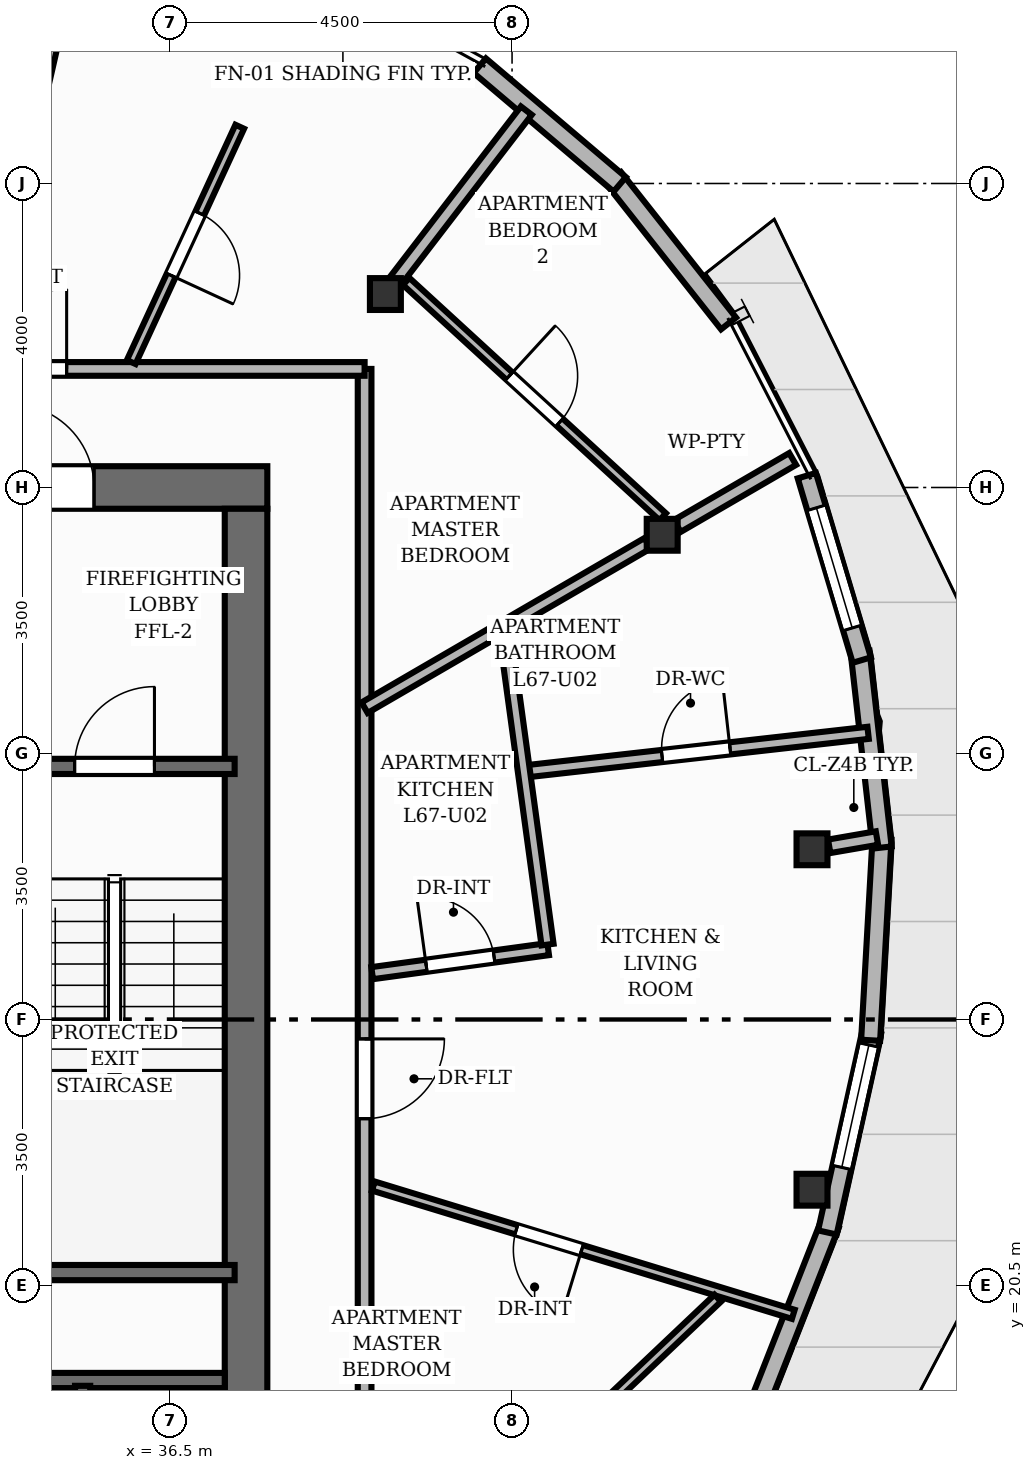
"""IFC4 building model, lengths in metres.
Left out: names, types, materials, properties, quantities, classifications, styles, units other than length and angle.
Written with IfcOpenShell. Run it as: python <this file> out.ifc"""

import sys

from ifc_helpers import new_model, si_unit, direction, frame, frame_2d, origin, origin_2d, place, context, subcontext, project, spatial, rectangle, i_section, extrude, element, fill, save


model = new_model("IFC4")
c1 = context("Model", 3, precision=1e-05, world=origin(), true_north=direction((0.0, 1.0)))
c2 = subcontext(c1, "Body", "Model", "MODEL_VIEW")
j1 = project(units=[si_unit("LENGTHUNIT", "METRE"), si_unit("PLANEANGLEUNIT", "RADIAN")], contexts=[c1])
p1 = place(None, origin())
s1 = spatial("IfcSite", under=j1, at=p1, CompositionType="ELEMENT")
p2 = place(p1, origin())
s2 = spatial("IfcBuilding", under=s1, at=p2, CompositionType="ELEMENT")
p3 = place(p2, frame((0.0, 0.0, 223.84)))
s3 = spatial("IfcBuildingStorey", under=s2, at=p3, CompositionType="ELEMENT", Elevation=223.84)
p4 = place(p3, frame((26.22, 31.0, 0.0), z_axis=(0.0, 0.0, 1.0), x_axis=(1.0, 0.0, 0.0)))
e1 = element("IfcWall", 1, at=p4, inside=s3, PredefinedType="SHEAR", context=c2, shape_type="SweptSolid", body=[
    extrude(rectangle(XDim=11.56, YDim=0.56, at=frame_2d((5.78, 0.0))), origin(), (0.0, 0.0, 1.0), 3.2),
])
p5 = place(p4, frame((8.18, 0.0, 0.0)))
e2 = element("IfcOpeningElement", 2, at=p5, cuts=e1, PredefinedType="OPENING", context=c2, shape_type="SweptSolid", body=[
    extrude(rectangle(XDim=1.1, YDim=2.15, at=frame_2d((0.55, 1.075))), frame((0.0, 0.29, 0.0), z_axis=(0.0, -1.0, 0.0), x_axis=(1.0, 0.0, 0.0)), (0.0, 0.0, 1.0), 0.58),
])
p6 = place(p4, frame((0.805, 0.0, 0.0)))
e3 = element("IfcOpeningElement", 3, at=p6, cuts=e1, PredefinedType="OPENING", context=c2, shape_type="SweptSolid", body=[
    extrude(rectangle(XDim=1.05, YDim=2.15, at=frame_2d((0.525, 1.075))), frame((0.0, 0.29, 0.0), z_axis=(0.0, -1.0, 0.0), x_axis=(1.0, 0.0, 0.0)), (0.0, 0.0, 1.0), 0.58),
])
p7 = place(p4, frame((2.555, 0.0, 0.0)))
e4 = element("IfcOpeningElement", 4, at=p7, cuts=e1, PredefinedType="OPENING", context=c2, shape_type="SweptSolid", body=[
    extrude(rectangle(XDim=1.05, YDim=2.15, at=frame_2d((0.525, 1.075))), frame((0.0, 0.29, 0.0), z_axis=(0.0, -1.0, 0.0), x_axis=(1.0, 0.0, 0.0)), (0.0, 0.0, 1.0), 0.58),
])
p8 = place(p4, frame((4.305, 0.0, 0.0)))
e5 = element("IfcOpeningElement", 5, at=p8, cuts=e1, PredefinedType="OPENING", context=c2, shape_type="SweptSolid", body=[
    extrude(rectangle(XDim=1.05, YDim=2.15, at=frame_2d((0.525, 1.075))), frame((0.0, 0.29, 0.0), z_axis=(0.0, -1.0, 0.0), x_axis=(1.0, 0.0, 0.0)), (0.0, 0.0, 1.0), 0.58),
])
p9 = place(p3, frame((37.5, 17.28, 0.0), z_axis=(0.0, 0.0, 1.0), x_axis=(0.0, 1.0, 0.0)))
e6 = element("IfcWall", 6, at=p9, inside=s3, PredefinedType="SHEAR", context=c2, shape_type="SweptSolid", body=[
    extrude(rectangle(XDim=13.44, YDim=0.56, at=frame_2d((6.72, 0.0))), origin(), (0.0, 0.0, 1.0), 3.2),
])
for number, where, z_axis, x_axis in (
    (7, (44.946, 26.24, 0.0), (0.0, 0.0, 1.0), (1.0, 0.0, 0.0)),
    (8, (42.975, 30.378, 0.0), (0.0, 0.0, 1.0), (1.0, 0.0, 0.0)),
    (9, (39.333, 33.545, 0.0), (0.0, 0.0, 1.0), (1.0, 0.0, 0.0)),
    (10, (44.946, 21.76, 0.0), (0.0, 0.0, 1.0), (1.0, 0.0, 0.0)),
):
    element("IfcColumn", number, at=place(p3, frame(where, z_axis=z_axis, x_axis=x_axis)), inside=s3, PredefinedType="COLUMN", context=c2, shape_type="SweptSolid", body=[
        extrude(i_section(OverallWidth=0.407, OverallDepth=0.419, WebThickness=0.031, FlangeThickness=0.049, at=origin_2d()), origin(), (0.0, 0.0, 1.0), 3.2),
    ])
p10 = place(p3, frame((45.18, 21.302, 0.0), z_axis=(0.0, 0.0, 1.0), x_axis=(-0.365588934877, -0.930776412838, 0.0)))
e11 = element("IfcWall", 11, at=p10, inside=s3, PredefinedType="SOLIDWALL", context=c2, shape_type="SweptSolid", body=[
    extrude(rectangle(XDim=2.739, YDim=0.25, at=frame_2d((1.369, 0.0))), origin(), (0.0, 0.0, 1.0), 2.577),
])
p11 = place(p3, frame((45.733, 23.836, 0.0), z_axis=(0.0, 0.0, 1.0), x_axis=(-0.21633718885, -0.976318708579, 0.0)))
e12 = element("IfcWall", 12, at=p11, inside=s3, PredefinedType="SOLIDWALL", context=c2, shape_type="SweptSolid", body=[
    extrude(rectangle(XDim=2.702, YDim=0.25, at=frame_2d((1.351, 0.0))), origin(), (0.0, 0.0, 1.0), 2.577),
])
p12 = place(p11, frame((0.175, 0.0, 0.85)))
e13 = element("IfcOpeningElement", 13, at=p12, cuts=e12, PredefinedType="OPENING", context=c2, shape_type="SweptSolid", body=[
    extrude(rectangle(XDim=1.65, YDim=1.55, at=frame_2d((0.825, 0.775))), frame((0.0, 0.135, 0.0), z_axis=(0.0, -1.0, 0.0), x_axis=(1.0, 0.0, 0.0)), (0.0, 0.0, 1.0), 0.27),
])
p13 = place(p3, frame((45.867, 26.374, 0.0), z_axis=(0.0, 0.0, 1.0), x_axis=(-0.056270814174, -0.998415542483, 0.0)))
e14 = element("IfcWall", 14, at=p13, inside=s3, PredefinedType="SOLIDWALL", context=c2, shape_type="SweptSolid", body=[
    extrude(rectangle(XDim=2.651, YDim=0.25, at=frame_2d((1.325, 0.0))), origin(), (0.0, 0.0, 1.0), 2.96),
])
p14 = place(p3, frame((45.579, 28.839, 0.0), z_axis=(0.0, 0.0, 1.0), x_axis=(0.112260931198, -0.993678762642, 0.0)))
e15 = element("IfcWall", 15, at=p14, inside=s3, PredefinedType="SOLIDWALL", context=c2, shape_type="SweptSolid", body=[
    extrude(rectangle(XDim=2.592, YDim=0.25, at=frame_2d((1.296, 0.0))), origin(), (0.0, 0.0, 1.0), 2.96),
])
p15 = place(p3, frame((44.878, 31.156, 0.0), z_axis=(0.0, 0.0, 1.0), x_axis=(0.285604720301, -0.958347506775, 0.0)))
e16 = element("IfcWall", 16, at=p15, inside=s3, PredefinedType="SOLIDWALL", context=c2, shape_type="SweptSolid", body=[
    extrude(rectangle(XDim=2.532, YDim=0.25, at=frame_2d((1.266, 0.0))), origin(), (0.0, 0.0, 1.0), 2.96),
])
p16 = place(p15, frame((0.441, 0.0, 0.85)))
e17 = element("IfcOpeningElement", 17, at=p16, cuts=e16, PredefinedType="OPENING", context=c2, shape_type="SweptSolid", body=[
    extrude(rectangle(XDim=1.65, YDim=1.55, at=frame_2d((0.825, 0.775))), frame((0.0, 0.135, 0.0), z_axis=(0.0, -1.0, 0.0), x_axis=(1.0, 0.0, 0.0)), (0.0, 0.0, 1.0), 0.27),
])
p17 = place(p3, frame((42.337, 35.071, 0.0), z_axis=(0.0, 0.0, 1.0), x_axis=(0.619881401672, -0.784695512833, 0.0)))
e18 = element("IfcWall", 18, at=p17, inside=s3, PredefinedType="SOLIDWALL", context=c2, shape_type="SweptSolid", body=[
    extrude(rectangle(XDim=2.437, YDim=0.25, at=frame_2d((1.218, 0.0))), origin(), (0.0, 0.0, 1.0), 2.96),
])
p18 = place(p3, frame((40.575, 36.55, 0.0), z_axis=(0.0, 0.0, 1.0), x_axis=(0.762614923672, -0.646852748462, 0.0)))
e19 = element("IfcWall", 19, at=p18, inside=s3, PredefinedType="SOLIDWALL", context=c2, shape_type="SweptSolid", body=[
    extrude(rectangle(XDim=2.415, YDim=0.25, at=frame_2d((1.208, 0.0))), origin(), (0.0, 0.0, 1.0), 2.96),
])
p19 = place(p3, frame((34.11, 20.67, 0.0), z_axis=(0.0, 0.0, 1.0), x_axis=(1.0, 0.0, 0.0)))
e20 = element("IfcWall", 20, at=p19, inside=s3, PredefinedType="SHEAR", context=c2, shape_type="SweptSolid", body=[
    extrude(rectangle(XDim=3.24, YDim=0.2, at=frame_2d((1.62, 0.0))), origin(), (0.0, 0.0, 1.0), 3.2),
])
p20 = place(p3, frame((34.11, 27.33, 0.0), z_axis=(0.0, 0.0, 1.0), x_axis=(1.0, 0.0, 0.0)))
e21 = element("IfcWall", 21, at=p20, inside=s3, PredefinedType="SHEAR", context=c2, shape_type="SweptSolid", body=[
    extrude(rectangle(XDim=3.24, YDim=0.2, at=frame_2d((1.62, 0.0))), origin(), (0.0, 0.0, 1.0), 3.2),
])
p21 = place(p20, frame((1.135, 0.0, 0.0)))
e22 = element("IfcOpeningElement", 22, at=p21, cuts=e21, PredefinedType="OPENING", context=c2, shape_type="SweptSolid", body=[
    extrude(rectangle(XDim=1.05, YDim=2.15, at=frame_2d((0.525, 1.075))), frame((0.0, 0.11, 0.0), z_axis=(0.0, -1.0, 0.0), x_axis=(1.0, 0.0, 0.0)), (0.0, 0.0, 1.0), 0.22),
])
p22 = place(p3, frame((33.5, 19.25, 0.0), z_axis=(0.0, 0.0, 1.0), x_axis=(1.0, 0.0, 0.0)))
e23 = element("IfcWall", 23, at=p22, inside=s3, PredefinedType="SHEAR", context=c2, shape_type="SweptSolid", body=[
    extrude(rectangle(XDim=3.72, YDim=0.2, at=frame_2d((1.86, 0.0))), origin(), (0.0, 0.0, 1.0), 3.2),
])
p23 = place(p3, frame((35.35, 17.32, 0.0), z_axis=(0.0, 0.0, 1.0), x_axis=(0.0, 1.0, 0.0)))
e24 = element("IfcWall", 24, at=p23, inside=s3, PredefinedType="SHEAR", context=c2, shape_type="SweptSolid", body=[
    extrude(rectangle(XDim=1.86, YDim=0.2, at=frame_2d((0.93, 0.0))), origin(), (0.0, 0.0, 1.0), 3.2),
])
p24 = place(p3, frame((45.173, 26.279, 0.0), z_axis=(0.0, 0.0, 1.0), x_axis=(0.985371537423, 0.170419873359, 0.0)))
e25 = element("IfcWall", 25, at=p24, inside=s3, PredefinedType="PARTITIONING", context=c2, shape_type="SweptSolid", body=[
    extrude(rectangle(XDim=0.637, YDim=0.18, at=frame_2d((0.319, 0.0))), origin(), (0.0, 0.0, 1.0), 2.403),
])
p25 = place(p3, frame((43.174, 30.493, 0.0), z_axis=(0.0, 0.0, 1.0), x_axis=(0.864599922959, 0.502460917106, 0.0)))
e26 = element("IfcWall", 26, at=p25, inside=s3, PredefinedType="PARTITIONING", context=c2, shape_type="SweptSolid", body=[
    extrude(rectangle(XDim=1.756, YDim=0.18, at=frame_2d((0.878, 0.0))), origin(), (0.0, 0.0, 1.0), 2.403),
])
p26 = place(p3, frame((39.473, 33.727, 0.0), z_axis=(0.0, 0.0, 1.0), x_axis=(0.609232660573, 0.792991529142, 0.0)))
e27 = element("IfcWall", 27, at=p26, inside=s3, PredefinedType="PARTITIONING", context=c2, shape_type="SweptSolid", body=[
    extrude(rectangle(XDim=2.814, YDim=0.18, at=frame_2d((1.407, 0.0))), origin(), (0.0, 0.0, 1.0), 2.403),
])
p27 = place(p3, frame((34.626, 35.483, 0.0), z_axis=(0.0, 0.0, 1.0), x_axis=(0.22291168124, 0.974838644272, 0.0)))
e28 = element("IfcWall", 28, at=p27, inside=s3, PredefinedType="PARTITIONING", context=c2, shape_type="SweptSolid", body=[
    extrude(rectangle(XDim=2.976, YDim=0.18, at=frame_2d((1.488, 0.0))), origin(), (0.0, 0.0, 1.0), 2.403),
])
p28 = place(p3, frame((39.06, 32.56, 0.0), z_axis=(0.0, 0.0, 1.0), x_axis=(0.0, -1.0, 0.0)))
e29 = element("IfcWall", 29, at=p28, inside=s3, PredefinedType="PARTITIONING", context=c2, shape_type="SweptSolid", body=[
    extrude(rectangle(XDim=17.12, YDim=0.18, at=frame_2d((8.56, 0.0))), origin(), (0.0, 0.0, 1.0), 2.955),
])
p29 = place(p28, frame((8.815, 0.0, 0.0)))
e30 = element("IfcOpeningElement", 30, at=p29, cuts=e29, PredefinedType="OPENING", context=c2, shape_type="SweptSolid", body=[
    extrude(rectangle(XDim=1.05, YDim=2.15, at=frame_2d((0.525, 1.075))), frame((0.0, 0.1, 0.0), z_axis=(0.0, -1.0, 0.0), x_axis=(1.0, 0.0, 0.0)), (0.0, 0.0, 1.0), 0.2),
])
p30 = place(p3, frame((33.26, 32.56, 0.0), z_axis=(0.0, 0.0, 1.0), x_axis=(1.0, 0.0, 0.0)))
e31 = element("IfcWall", 31, at=p30, inside=s3, PredefinedType="PARTITIONING", context=c2, shape_type="SweptSolid", body=[
    extrude(rectangle(XDim=5.8, YDim=0.18, at=frame_2d((2.9, 0.0))), origin(), (0.0, 0.0, 1.0), 2.955),
])
p31 = place(p30, frame((0.83, 0.0, 0.0)))
e32 = element("IfcOpeningElement", 32, at=p31, cuts=e31, PredefinedType="OPENING", context=c2, shape_type="SweptSolid", body=[
    extrude(rectangle(XDim=1.05, YDim=2.15, at=frame_2d((0.525, 1.075))), frame((0.0, 0.1, 0.0), z_axis=(0.0, -1.0, 0.0), x_axis=(1.0, 0.0, 0.0)), (0.0, 0.0, 1.0), 0.2),
])
p32 = place(p3, frame((41.156, 27.262, 0.0), z_axis=(0.0, 0.0, 1.0), x_axis=(0.993735184374, 0.111760383578, 0.0)))
e33 = element("IfcWall", 33, at=p32, inside=s3, PredefinedType="PLUMBINGWALL", context=c2, shape_type="SweptSolid", body=[
    extrude(rectangle(XDim=4.557, YDim=0.16, at=frame_2d((2.278, 0.0))), origin(), (0.0, 0.0, 1.0), 2.692),
])
p33 = place(p32, frame((1.829, 0.0, 0.0)))
e34 = element("IfcOpeningElement", 34, at=p33, cuts=e33, PredefinedType="OPENING", context=c2, shape_type="SweptSolid", body=[
    extrude(rectangle(XDim=0.9, YDim=2.1, at=frame_2d((0.45, 1.05))), frame((0.0, 0.09, 0.0), z_axis=(0.0, -1.0, 0.0), x_axis=(1.0, 0.0, 0.0)), (0.0, 0.0, 1.0), 0.18),
])
p34 = place(p3, frame((44.7, 20.121, 0.0), z_axis=(0.0, 0.0, 1.0), x_axis=(-0.956379122361, 0.29212835246, 0.0)))
e35 = element("IfcWall", 35, at=p34, inside=s3, PredefinedType="PARTITIONING", context=c2, shape_type="SweptSolid", body=[
    extrude(rectangle(XDim=5.777, YDim=0.125, at=frame_2d((2.889, 0.0))), origin(), (0.0, 0.0, 1.0), 2.692),
])
p35 = place(p34, frame((2.91, 0.0, 0.0)))
e36 = element("IfcOpeningElement", 36, at=p35, cuts=e35, PredefinedType="OPENING", context=c2, shape_type="SweptSolid", body=[
    extrude(rectangle(XDim=0.9, YDim=2.1, at=frame_2d((0.45, 1.05))), frame((0.0, 0.073, 0.0), z_axis=(0.0, -1.0, 0.0), x_axis=(1.0, 0.0, 0.0)), (0.0, 0.0, 1.0), 0.145),
])
p36 = place(p3, frame((39.159, 24.61, 0.0), z_axis=(0.0, 0.0, 1.0), x_axis=(0.990823810893, 0.135159815654, 0.0)))
e37 = element("IfcWall", 37, at=p36, inside=s3, PredefinedType="PLUMBINGWALL", context=c2, shape_type="SweptSolid", body=[
    extrude(rectangle(XDim=2.337, YDim=0.16, at=frame_2d((1.169, 0.0))), origin(), (0.0, 0.0, 1.0), 2.692),
])
p37 = place(p36, frame((0.719, 0.0, 0.0)))
e38 = element("IfcOpeningElement", 38, at=p37, cuts=e37, PredefinedType="OPENING", context=c2, shape_type="SweptSolid", body=[
    extrude(rectangle(XDim=0.9, YDim=2.1, at=frame_2d((0.45, 1.05))), frame((0.0, 0.09, 0.0), z_axis=(0.0, -1.0, 0.0), x_axis=(1.0, 0.0, 0.0)), (0.0, 0.0, 1.0), 0.18),
])
p38 = place(p3, frame((41.467, 24.985, 0.0), z_axis=(0.0, 0.0, 1.0), x_axis=(-0.135218975067, 0.990815739066, 0.0)))
e39 = element("IfcWall", 39, at=p38, inside=s3, PredefinedType="PLUMBINGWALL", context=c2, shape_type="SweptSolid", body=[
    extrude(rectangle(XDim=4.223, YDim=0.16, at=frame_2d((2.112, 0.0))), origin(), (0.0, 0.0, 1.0), 2.955),
])
p39 = place(p3, frame((39.06, 28.103, 0.0), z_axis=(0.0, 0.0, 1.0), x_axis=(0.864618907014, 0.502428249239, 0.0)))
e40 = element("IfcWall", 40, at=p39, inside=s3, PredefinedType="PLUMBINGWALL", context=c2, shape_type="SweptSolid", body=[
    extrude(rectangle(XDim=4.305, YDim=0.16, at=frame_2d((2.153, 0.0))), origin(), (0.0, 0.0, 1.0), 2.403),
])
p40 = place(p3, frame((43.707, 20.333, 0.0), z_axis=(0.0, 0.0, 1.0), x_axis=(-0.725799476315, -0.687906330965, 0.0)))
e41 = element("IfcWall", 41, at=p40, inside=s3, PredefinedType="PARTITIONING", context=c2, shape_type="SweptSolid", body=[
    extrude(rectangle(XDim=6.282, YDim=0.125, at=frame_2d((3.141, 0.0))), origin(), (0.0, 0.0, 1.0), 2.955),
])
p41 = place(p40, frame((2.691, 0.0, 0.0)))
e42 = element("IfcOpeningElement", 42, at=p41, cuts=e41, PredefinedType="OPENING", context=c2, shape_type="SweptSolid", body=[
    extrude(rectangle(XDim=0.9, YDim=2.1, at=frame_2d((0.45, 1.05))), frame((0.0, 0.073, 0.0), z_axis=(0.0, -1.0, 0.0), x_axis=(1.0, 0.0, 0.0)), (0.0, 0.0, 1.0), 0.145),
])
p42 = place(p3, frame((37.417, 35.747, 0.0), z_axis=(0.0, 0.0, 1.0), x_axis=(-0.41880384085, -0.908076727424, 0.0)))
e43 = element("IfcWall", 43, at=p42, inside=s3, PredefinedType="PARTITIONING", context=c2, shape_type="SweptSolid", body=[
    extrude(rectangle(XDim=3.409, YDim=0.125, at=frame_2d((1.705, 0.0))), origin(), (0.0, 0.0, 1.0), 2.955),
])
p43 = place(p42, frame((1.255, 0.0, 0.0)))
e44 = element("IfcOpeningElement", 44, at=p43, cuts=e43, PredefinedType="OPENING", context=c2, shape_type="SweptSolid", body=[
    extrude(rectangle(XDim=0.9, YDim=2.1, at=frame_2d((0.45, 1.05))), frame((0.0, 0.073, 0.0), z_axis=(0.0, -1.0, 0.0), x_axis=(1.0, 0.0, 0.0)), (0.0, 0.0, 1.0), 0.145),
])
p44 = place(p3, frame((39.607, 33.712, 0.0), z_axis=(0.0, 0.0, 1.0), x_axis=(0.736828890574, -0.676079274949, 0.0)))
e45 = element("IfcWall", 45, at=p44, inside=s3, PredefinedType="PARTITIONING", context=c2, shape_type="SweptSolid", body=[
    extrude(rectangle(XDim=4.582, YDim=0.125, at=frame_2d((2.291, 0.0))), origin(), (0.0, 0.0, 1.0), 2.488),
])
p45 = place(p44, frame((1.841, 0.0, 0.0)))
e46 = element("IfcOpeningElement", 46, at=p45, cuts=e45, PredefinedType="OPENING", context=c2, shape_type="SweptSolid", body=[
    extrude(rectangle(XDim=0.9, YDim=2.1, at=frame_2d((0.45, 1.05))), frame((0.0, 0.073, 0.0), z_axis=(0.0, -1.0, 0.0), x_axis=(1.0, 0.0, 0.0)), (0.0, 0.0, 1.0), 0.145),
])
p46 = place(p12, origin())
e47 = element("IfcWindow", 47, at=p46, inside=s3, PartitioningType="SINGLE_PANEL", PredefinedType="WINDOW", context=c2, shape_type="SweptSolid", body=[
    extrude(rectangle(XDim=1.65, YDim=1.55, at=frame_2d((0.825, 0.775))), frame((0.0, 0.03, 0.0), z_axis=(0.0, -1.0, 0.0), x_axis=(1.0, 0.0, 0.0)), (0.0, 0.0, 1.0), 0.06),
])
fill(e13, e47)
p47 = place(p16, origin())
e48 = element("IfcWindow", 48, at=p47, inside=s3, PartitioningType="SINGLE_PANEL", PredefinedType="WINDOW", context=c2, shape_type="SweptSolid", body=[
    extrude(rectangle(XDim=1.65, YDim=1.55, at=frame_2d((0.825, 0.775))), frame((0.0, 0.03, 0.0), z_axis=(0.0, -1.0, 0.0), x_axis=(1.0, 0.0, 0.0)), (0.0, 0.0, 1.0), 0.06),
])
fill(e17, e48)
p48 = place(p21, origin())
e49 = element("IfcDoor", 49, at=p48, inside=s3, OperationType="SINGLE_SWING_RIGHT", PredefinedType="DOOR", context=c2, shape_type="SweptSolid", body=[
    extrude(rectangle(XDim=1.05, YDim=2.15, at=frame_2d((0.525, 1.075))), frame((0.0, 0.025, 0.0), z_axis=(0.0, -1.0, 0.0), x_axis=(1.0, 0.0, 0.0)), (0.0, 0.0, 1.0), 0.05),
])
fill(e22, e49)
p49 = place(p5, origin())
e50 = element("IfcDoor", 50, at=p49, inside=s3, OperationType="SINGLE_SWING_LEFT", PredefinedType="DOOR", context=c2, shape_type="SweptSolid", body=[
    extrude(rectangle(XDim=1.1, YDim=2.15, at=frame_2d((0.55, 1.075))), frame((0.0, 0.025, 0.0), z_axis=(0.0, -1.0, 0.0), x_axis=(1.0, 0.0, 0.0)), (0.0, 0.0, 1.0), 0.05),
])
fill(e2, e50)
p50 = place(p29, origin())
e51 = element("IfcDoor", 51, at=p50, inside=s3, OperationType="SINGLE_SWING_LEFT", PredefinedType="DOOR", context=c2, shape_type="SweptSolid", body=[
    extrude(rectangle(XDim=1.05, YDim=2.15, at=frame_2d((0.525, 1.075))), frame((0.0, 0.025, 0.0), z_axis=(0.0, -1.0, 0.0), x_axis=(1.0, 0.0, 0.0)), (0.0, 0.0, 1.0), 0.05),
])
fill(e30, e51)
p51 = place(p33, origin())
e52 = element("IfcDoor", 52, at=p51, inside=s3, OperationType="SINGLE_SWING_RIGHT", PredefinedType="DOOR", context=c2, shape_type="SweptSolid", body=[
    extrude(rectangle(XDim=0.9, YDim=2.1, at=frame_2d((0.45, 1.05))), frame((0.0, 0.025, 0.0), z_axis=(0.0, -1.0, 0.0), x_axis=(1.0, 0.0, 0.0)), (0.0, 0.0, 1.0), 0.05),
])
fill(e34, e52)
p52 = place(p35, origin())
e53 = element("IfcDoor", 53, at=p52, inside=s3, OperationType="SINGLE_SWING_LEFT", PredefinedType="DOOR", context=c2, shape_type="SweptSolid", body=[
    extrude(rectangle(XDim=0.9, YDim=2.1, at=frame_2d((0.45, 1.05))), frame((0.0, 0.025, 0.0), z_axis=(0.0, -1.0, 0.0), x_axis=(1.0, 0.0, 0.0)), (0.0, 0.0, 1.0), 0.05),
])
fill(e36, e53)
p53 = place(p37, origin())
e54 = element("IfcDoor", 54, at=p53, inside=s3, OperationType="SINGLE_SWING_LEFT", PredefinedType="DOOR", context=c2, shape_type="SweptSolid", body=[
    extrude(rectangle(XDim=0.9, YDim=2.1, at=frame_2d((0.45, 1.05))), frame((0.0, 0.025, 0.0), z_axis=(0.0, -1.0, 0.0), x_axis=(1.0, 0.0, 0.0)), (0.0, 0.0, 1.0), 0.05),
])
fill(e38, e54)
p54 = place(p31, origin())
e55 = element("IfcDoor", 55, at=p54, inside=s3, OperationType="SINGLE_SWING_RIGHT", PredefinedType="DOOR", context=c2, shape_type="SweptSolid", body=[
    extrude(rectangle(XDim=1.05, YDim=2.15, at=frame_2d((0.525, 1.075))), frame((0.0, 0.025, 0.0), z_axis=(0.0, -1.0, 0.0), x_axis=(1.0, 0.0, 0.0)), (0.0, 0.0, 1.0), 0.05),
])
fill(e32, e55)
p55 = place(p43, origin())
e56 = element("IfcDoor", 56, at=p55, inside=s3, OperationType="SINGLE_SWING_RIGHT", PredefinedType="DOOR", context=c2, shape_type="SweptSolid", body=[
    extrude(rectangle(XDim=0.9, YDim=2.1, at=frame_2d((0.45, 1.05))), frame((0.0, 0.025, 0.0), z_axis=(0.0, -1.0, 0.0), x_axis=(1.0, 0.0, 0.0)), (0.0, 0.0, 1.0), 0.05),
])
fill(e44, e56)
p56 = place(p45, origin())
e57 = element("IfcDoor", 57, at=p56, inside=s3, OperationType="SINGLE_SWING_LEFT", PredefinedType="DOOR", context=c2, shape_type="SweptSolid", body=[
    extrude(rectangle(XDim=0.9, YDim=2.1, at=frame_2d((0.45, 1.05))), frame((0.0, 0.025, 0.0), z_axis=(0.0, -1.0, 0.0), x_axis=(1.0, 0.0, 0.0)), (0.0, 0.0, 1.0), 0.05),
])
fill(e46, e57)
save(model, sys.argv[1])
